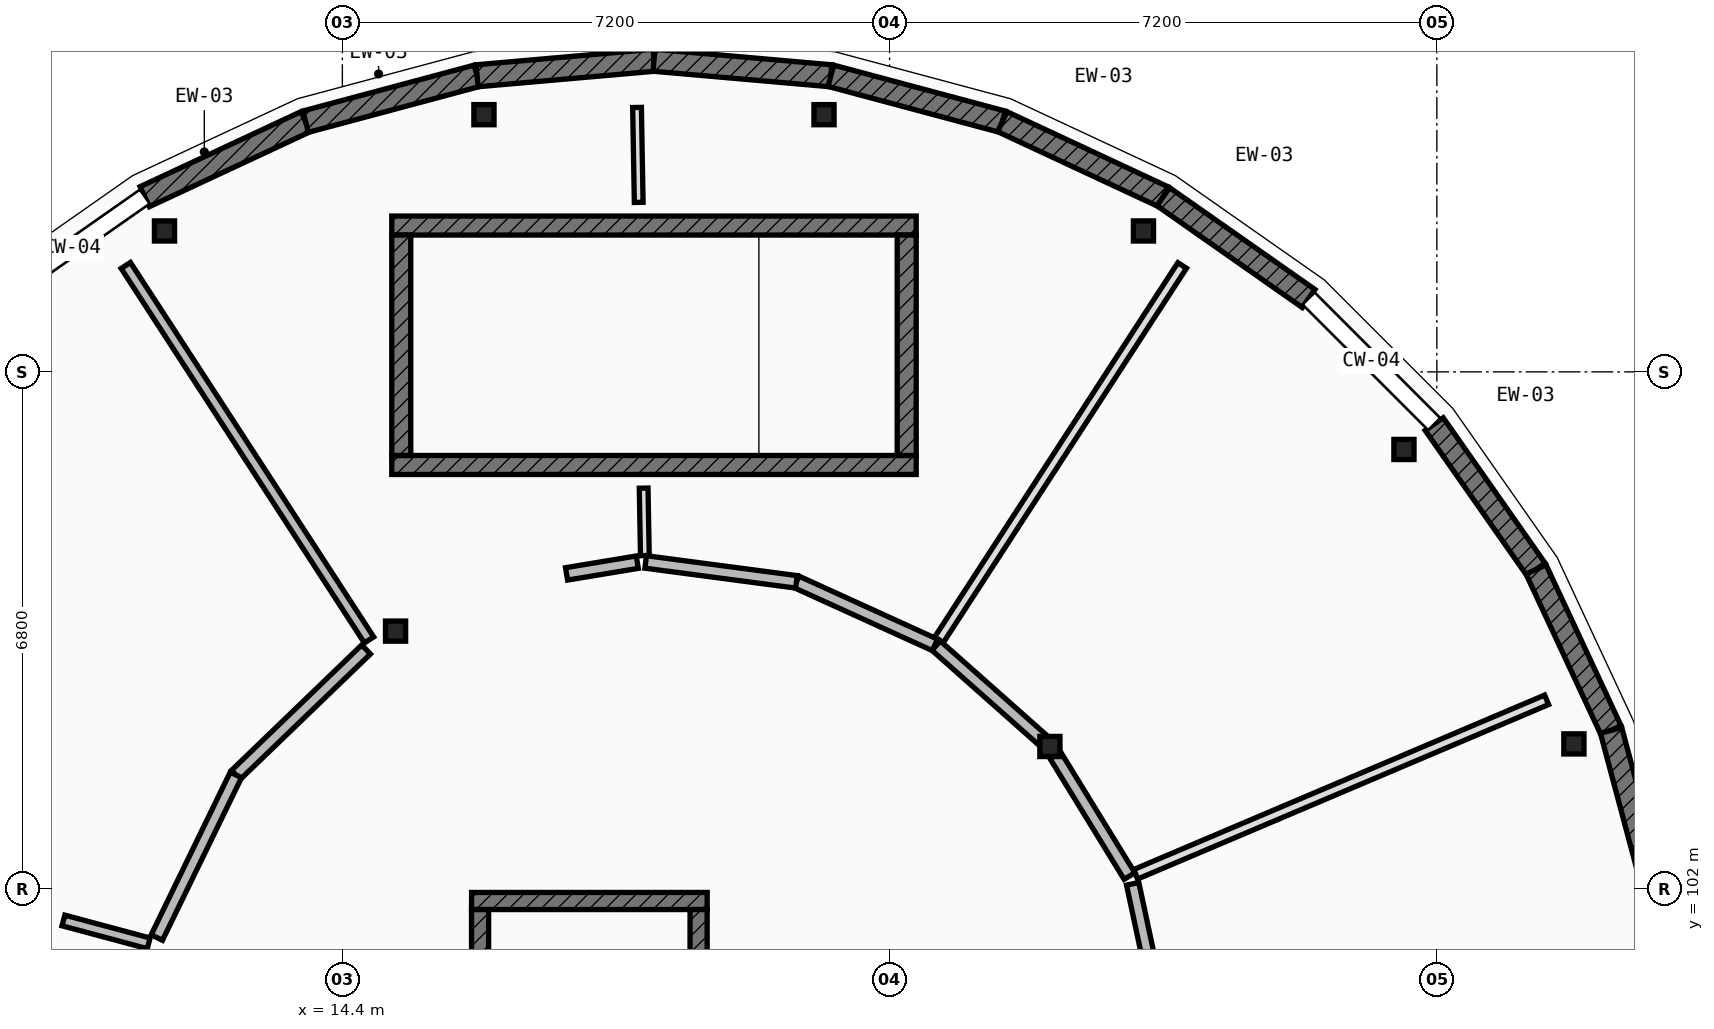
"""IFC4 building model, lengths in metres.
Left out: names, types, materials, properties, quantities, classifications, styles, units other than length and angle.
Written with IfcOpenShell. Run it as: python <this file> out.ifc"""

import sys

from ifc_helpers import new_model, si_unit, direction, frame, frame_2d, origin, origin_2d, place, context, subcontext, project, spatial, rectangle, extrude, element, fill, save


model = new_model("IFC4")
c1 = context("Model", 3, precision=1e-05, world=origin(), true_north=direction((0.0, 1.0)))
c2 = subcontext(c1, "Body", "Model", "MODEL_VIEW")
j1 = project(units=[si_unit("LENGTHUNIT", "METRE"), si_unit("PLANEANGLEUNIT", "RADIAN")], contexts=[c1])
p1 = place(None, origin())
s1 = spatial("IfcSite", under=j1, at=p1, CompositionType="ELEMENT")
p2 = place(p1, origin())
s2 = spatial("IfcBuilding", under=s1, at=p2, CompositionType="ELEMENT")
p3 = place(p2, frame((0.0, 0.0, 17.15)))
s3 = spatial("IfcBuildingStorey", under=s2, at=p3, CompositionType="ELEMENT", Elevation=17.15)
for number, where, z_axis, x_axis in (
    (1, (30.603, 103.905, 0.0), (0.0, 0.0, 1.0), (1.0, 0.0, 0.0)),
    (2, (28.367, 107.779, 0.0), (0.0, 0.0, 1.0), (1.0, 0.0, 0.0)),
    (3, (24.94, 110.654, 0.0), (0.0, 0.0, 1.0), (1.0, 0.0, 0.0)),
    (4, (20.737, 112.184, 0.0), (0.0, 0.0, 1.0), (1.0, 0.0, 0.0)),
    (5, (16.263, 112.184, 0.0), (0.0, 0.0, 1.0), (1.0, 0.0, 0.0)),
    (6, (12.06, 110.654, 0.0), (0.0, 0.0, 1.0), (1.0, 0.0, 0.0)),
    (7, (23.709, 103.871, 0.0), (0.0, 0.0, 1.0), (1.0, 0.0, 0.0)),
    (8, (15.1, 105.389, 0.0), (0.0, 0.0, 1.0), (1.0, 0.0, 0.0)),
):
    element("IfcColumn", number, at=place(p3, frame(where, z_axis=z_axis, x_axis=x_axis)), inside=s3, PredefinedType="COLUMN", context=c2, shape_type="SweptSolid", body=[
        extrude(rectangle(XDim=0.265, YDim=0.265, at=origin_2d()), origin(), (0.0, 0.0, 1.0), 4.2),
    ])
p4 = place(p3, frame((11.8, 111.105, 0.0), z_axis=(0.0, 0.0, 1.0), x_axis=(0.906321946979, 0.422587894318, 0.0)))
e9 = element("IfcWall", 9, at=p4, inside=s3, PredefinedType="ELEMENTEDWALL", context=c2, shape_type="SweptSolid", body=[
    extrude(rectangle(XDim=2.336, YDim=0.29, at=frame_2d((1.168, 0.0))), origin(), (0.0, 0.0, 1.0), 3.369),
])
p5 = place(p4, frame((0.468, 0.0, 0.85)))
e10 = element("IfcOpeningElement", 10, at=p5, cuts=e9, PredefinedType="OPENING", context=c2, shape_type="SweptSolid", body=[
    extrude(rectangle(XDim=1.4, YDim=1.25, at=frame_2d((0.7, 0.625))), frame((0.0, 0.155, 0.0), z_axis=(0.0, -1.0, 0.0), x_axis=(1.0, 0.0, 0.0)), (0.0, 0.0, 1.0), 0.31),
])
p6 = place(p3, frame((13.917, 112.092, 0.0), z_axis=(0.0, 0.0, 1.0), x_axis=(0.965981166673, 0.258612423585, 0.0)))
e11 = element("IfcWall", 11, at=p6, inside=s3, PredefinedType="ELEMENTEDWALL", context=c2, shape_type="SweptSolid", body=[
    extrude(rectangle(XDim=2.335, YDim=0.29, at=frame_2d((1.168, 0.0))), origin(), (0.0, 0.0, 1.0), 3.369),
])
p7 = place(p6, frame((0.468, 0.0, 0.85)))
e12 = element("IfcOpeningElement", 12, at=p7, cuts=e11, PredefinedType="OPENING", context=c2, shape_type="SweptSolid", body=[
    extrude(rectangle(XDim=1.4, YDim=1.6, at=frame_2d((0.7, 0.8))), frame((0.0, 0.155, 0.0), z_axis=(0.0, -1.0, 0.0), x_axis=(1.0, 0.0, 0.0)), (0.0, 0.0, 1.0), 0.31),
])
for number, where, z_axis, x_axis in (
    (13, (16.173, 112.696, 0.0), (0.0, 0.0, 1.0), (0.996, 0.087, 0.0)),
    (14, (18.5, 112.9, 0.0), (0.0, 0.0, 1.0), (0.996, -0.087, 0.0)),
):
    element("IfcWall", number, at=place(p3, frame(where, z_axis=z_axis, x_axis=x_axis)), inside=s3, PredefinedType="ELEMENTEDWALL", context=c2, shape_type="SweptSolid", body=[
        extrude(rectangle(XDim=2.336, YDim=0.29, at=frame_2d((1.168, 0.0))), origin(), (0.0, 0.0, 1.0), 3.369),
    ])
p8 = place(p3, frame((20.827, 112.696, 0.0), z_axis=(0.0, 0.0, 1.0), x_axis=(0.965981166673, -0.258612423585, 0.0)))
e15 = element("IfcWall", 15, at=p8, inside=s3, PredefinedType="ELEMENTEDWALL", context=c2, shape_type="SweptSolid", body=[
    extrude(rectangle(XDim=2.335, YDim=0.29, at=frame_2d((1.168, 0.0))), origin(), (0.0, 0.0, 1.0), 3.369),
])
p9 = place(p8, frame((0.468, 0.0, 0.85)))
e16 = element("IfcOpeningElement", 16, at=p9, cuts=e15, PredefinedType="OPENING", context=c2, shape_type="SweptSolid", body=[
    extrude(rectangle(XDim=1.4, YDim=1.9, at=frame_2d((0.7, 0.95))), frame((0.0, 0.155, 0.0), z_axis=(0.0, -1.0, 0.0), x_axis=(1.0, 0.0, 0.0)), (0.0, 0.0, 1.0), 0.31),
])
p10 = place(p3, frame((23.083, 112.092, 0.0), z_axis=(0.0, 0.0, 1.0), x_axis=(0.906321946979, -0.422587894318, 0.0)))
e17 = element("IfcWall", 17, at=p10, inside=s3, PredefinedType="ELEMENTEDWALL", context=c2, shape_type="SweptSolid", body=[
    extrude(rectangle(XDim=2.336, YDim=0.29, at=frame_2d((1.168, 0.0))), origin(), (0.0, 0.0, 1.0), 3.369),
])
p11 = place(p10, frame((0.468, 0.0, 0.85)))
e18 = element("IfcOpeningElement", 18, at=p11, cuts=e17, PredefinedType="OPENING", context=c2, shape_type="SweptSolid", body=[
    extrude(rectangle(XDim=1.4, YDim=2.2, at=frame_2d((0.7, 1.1))), frame((0.0, 0.155, 0.0), z_axis=(0.0, -1.0, 0.0), x_axis=(1.0, 0.0, 0.0)), (0.0, 0.0, 1.0), 0.31),
])
p12 = place(p3, frame((25.2, 111.105, 0.0), z_axis=(0.0, 0.0, 1.0), x_axis=(0.819045278347, -0.573728883722, 0.0)))
e19 = element("IfcWall", 19, at=p12, inside=s3, PredefinedType="ELEMENTEDWALL", context=c2, shape_type="SweptSolid", body=[
    extrude(rectangle(XDim=2.336, YDim=0.29, at=frame_2d((1.168, 0.0))), origin(), (0.0, 0.0, 1.0), 3.369),
])
p13 = place(p12, frame((0.443, 0.0, 0.85)))
e20 = element("IfcOpeningElement", 20, at=p13, cuts=e19, PredefinedType="OPENING", context=c2, shape_type="SweptSolid", body=[
    extrude(rectangle(XDim=1.45, YDim=1.45, at=frame_2d((0.725, 0.725))), frame((0.0, 0.155, 0.0), z_axis=(0.0, -1.0, 0.0), x_axis=(1.0, 0.0, 0.0)), (0.0, 0.0, 1.0), 0.31),
])
p14 = place(p3, frame((28.765, 108.113, 0.0), z_axis=(0.0, 0.0, 1.0), x_axis=(0.573728883722, -0.819045278347, 0.0)))
e21 = element("IfcWall", 21, at=p14, inside=s3, PredefinedType="ELEMENTEDWALL", context=c2, shape_type="SweptSolid", body=[
    extrude(rectangle(XDim=2.336, YDim=0.29, at=frame_2d((1.168, 0.0))), origin(), (0.0, 0.0, 1.0), 3.369),
])
p15 = place(p14, frame((0.443, 0.0, 0.85)))
e22 = element("IfcOpeningElement", 22, at=p15, cuts=e21, PredefinedType="OPENING", context=c2, shape_type="SweptSolid", body=[
    extrude(rectangle(XDim=1.45, YDim=1.75, at=frame_2d((0.725, 0.875))), frame((0.0, 0.155, 0.0), z_axis=(0.0, -1.0, 0.0), x_axis=(1.0, 0.0, 0.0)), (0.0, 0.0, 1.0), 0.31),
])
p16 = place(p3, frame((30.105, 106.2, 0.0), z_axis=(0.0, 0.0, 1.0), x_axis=(0.422587894318, -0.906321946979, 0.0)))
e23 = element("IfcWall", 23, at=p16, inside=s3, PredefinedType="ELEMENTEDWALL", context=c2, shape_type="SweptSolid", body=[
    extrude(rectangle(XDim=2.336, YDim=0.29, at=frame_2d((1.168, 0.0))), origin(), (0.0, 0.0, 1.0), 3.369),
])
p17 = place(p16, frame((0.443, 0.0, 0.85)))
e24 = element("IfcOpeningElement", 24, at=p17, cuts=e23, PredefinedType="OPENING", context=c2, shape_type="SweptSolid", body=[
    extrude(rectangle(XDim=1.45, YDim=2.05, at=frame_2d((0.725, 1.025))), frame((0.0, 0.155, 0.0), z_axis=(0.0, -1.0, 0.0), x_axis=(1.0, 0.0, 0.0)), (0.0, 0.0, 1.0), 0.31),
])
p18 = place(p3, frame((31.092, 104.083, 0.0), z_axis=(0.0, 0.0, 1.0), x_axis=(0.258612423585, -0.965981166673, 0.0)))
e25 = element("IfcWall", 25, at=p18, inside=s3, PredefinedType="ELEMENTEDWALL", context=c2, shape_type="SweptSolid", body=[
    extrude(rectangle(XDim=2.335, YDim=0.29, at=frame_2d((1.168, 0.0))), origin(), (0.0, 0.0, 1.0), 3.369),
])
p19 = place(p18, frame((0.418, 0.0, 0.85)))
e26 = element("IfcOpeningElement", 26, at=p19, cuts=e25, PredefinedType="OPENING", context=c2, shape_type="SweptSolid", body=[
    extrude(rectangle(XDim=1.5, YDim=1.3, at=frame_2d((0.75, 0.65))), frame((0.0, 0.155, 0.0), z_axis=(0.0, -1.0, 0.0), x_axis=(1.0, 0.0, 0.0)), (0.0, 0.0, 1.0), 0.31),
])
p20 = place(p3, frame((15.05, 107.575, 0.0), z_axis=(0.0, 0.0, 1.0), x_axis=(1.0, 0.0, 0.0)))
e27 = element("IfcWall", 27, at=p20, inside=s3, PredefinedType="SHEAR", context=c2, shape_type="SweptSolid", body=[
    extrude(rectangle(XDim=6.9, YDim=0.25, at=frame_2d((3.45, 0.0))), origin(), (0.0, 0.0, 1.0), 4.015),
])
p21 = place(p20, frame((0.43, 0.0, 0.0)))
e28 = element("IfcOpeningElement", 28, at=p21, cuts=e27, PredefinedType="OPENING", context=c2, shape_type="SweptSolid", body=[
    extrude(rectangle(XDim=1.1, YDim=2.15, at=frame_2d((0.55, 1.075))), frame((0.0, 0.135, 0.0), z_axis=(0.0, -1.0, 0.0), x_axis=(1.0, 0.0, 0.0)), (0.0, 0.0, 1.0), 0.27),
])
p22 = place(p3, frame((15.05, 110.725, 0.0), z_axis=(0.0, 0.0, 1.0), x_axis=(1.0, 0.0, 0.0)))
e29 = element("IfcWall", 29, at=p22, inside=s3, PredefinedType="SHEAR", context=c2, shape_type="SweptSolid", body=[
    extrude(rectangle(XDim=6.9, YDim=0.25, at=frame_2d((3.45, 0.0))), origin(), (0.0, 0.0, 1.0), 4.015),
])
for number, where, z_axis, x_axis in (
    (30, (15.175, 107.7, 0.0), (0.0, 0.0, 1.0), (0.0, 1.0, 0.0)),
    (31, (21.825, 107.7, 0.0), (0.0, 0.0, 1.0), (0.0, 1.0, 0.0)),
):
    element("IfcWall", number, at=place(p3, frame(where, z_axis=z_axis, x_axis=x_axis)), inside=s3, PredefinedType="SHEAR", context=c2, shape_type="SweptSolid", body=[
        extrude(rectangle(XDim=2.9, YDim=0.25, at=frame_2d((1.45, 0.0))), origin(), (0.0, 0.0, 1.0), 4.015),
    ])
p23 = place(p3, frame((16.1, 101.838, 0.0), z_axis=(0.0, 0.0, 1.0), x_axis=(1.0, 0.0, 0.0)))
e32 = element("IfcWall", 32, at=p23, inside=s3, PredefinedType="SHEAR", context=c2, shape_type="SweptSolid", body=[
    extrude(rectangle(XDim=3.1, YDim=0.225, at=frame_2d((1.55, 0.0))), origin(), (0.0, 0.0, 1.0), 4.015),
])
for number, where, z_axis, x_axis in (
    (33, (16.212, 99.575, 0.0), (0.0, 0.0, 1.0), (0.0, 1.0, 0.0)),
    (34, (19.087, 99.575, 0.0), (0.0, 0.0, 1.0), (0.0, 1.0, 0.0)),
):
    element("IfcWall", number, at=place(p3, frame(where, z_axis=z_axis, x_axis=x_axis)), inside=s3, PredefinedType="SHEAR", context=c2, shape_type="SweptSolid", body=[
        extrude(rectangle(XDim=2.15, YDim=0.225, at=frame_2d((1.075, 0.0))), origin(), (0.0, 0.0, 1.0), 4.015),
    ])
p24 = place(p3, frame((14.751, 105.273, 0.0), z_axis=(0.0, 0.0, 1.0), x_axis=(-0.544677189284, 0.838645789039, 0.0)))
e35 = element("IfcWall", 35, at=p24, inside=s3, PredefinedType="PARTITIONING", context=c2, shape_type="SweptSolid", body=[
    extrude(rectangle(XDim=5.875, YDim=0.145, at=frame_2d((2.938, 0.0))), origin(), (0.0, 0.0, 1.0), 3.344),
])
p25 = place(p3, frame((11.852, 101.281, 0.0), z_axis=(0.0, 0.0, 1.0), x_axis=(-0.965846685591, 0.259114221787, 0.0)))
e36 = element("IfcWall", 36, at=p25, inside=s3, PredefinedType="PARTITIONING", context=c2, shape_type="SweptSolid", body=[
    extrude(rectangle(XDim=1.162, YDim=0.145, at=frame_2d((0.581, 0.0))), origin(), (0.0, 0.0, 1.0), 3.344),
])
p26 = place(p3, frame((24.836, 102.189, 0.0), z_axis=(0.0, 0.0, 1.0), x_axis=(0.920468107404, 0.390817685438, 0.0)))
e37 = element("IfcWall", 37, at=p26, inside=s3, PredefinedType="PLUMBINGWALL", context=c2, shape_type="SweptSolid", body=[
    extrude(rectangle(XDim=5.875, YDim=0.135, at=frame_2d((2.938, 0.0))), origin(), (0.0, 0.0, 1.0), 3.344),
])
p27 = place(p3, frame((22.249, 105.273, 0.0), z_axis=(0.0, 0.0, 1.0), x_axis=(0.544677189284, 0.838645789039, 0.0)))
e38 = element("IfcWall", 38, at=p27, inside=s3, PredefinedType="PLUMBINGWALL", context=c2, shape_type="SweptSolid", body=[
    extrude(rectangle(XDim=5.875, YDim=0.135, at=frame_2d((2.938, 0.0))), origin(), (0.0, 0.0, 1.0), 3.344),
])
p28 = place(p3, frame((18.38, 106.382, 0.0), z_axis=(0.0, 0.0, 1.0), x_axis=(-0.017869018934, 0.999840336335, 0.0)))
e39 = element("IfcWall", 39, at=p28, inside=s3, PredefinedType="PARTITIONING", context=c2, shape_type="SweptSolid", body=[
    extrude(rectangle(XDim=0.888, YDim=0.115, at=frame_2d((0.444, 0.0))), origin(), (0.0, 0.0, 1.0), 3.344),
])
p29 = place(p3, frame((18.299, 111.03, 0.0), z_axis=(0.0, 0.0, 1.0), x_axis=(-0.017589147167, 0.999845298985, 0.0)))
e40 = element("IfcWall", 40, at=p29, inside=s3, PredefinedType="PARTITIONING", context=c2, shape_type="SweptSolid", body=[
    extrude(rectangle(XDim=1.249, YDim=0.115, at=frame_2d((0.625, 0.0))), origin(), (0.0, 0.0, 1.0), 3.344),
])
p30 = place(p3, frame((14.712, 105.147, 0.0), z_axis=(0.0, 0.0, 1.0), x_axis=(-0.720225223762, -0.693740316731, 0.0)))
e41 = element("IfcWall", 41, at=p30, inside=s3, PredefinedType="PARTITIONING", context=c2, shape_type="SweptSolid", body=[
    extrude(rectangle(XDim=2.378, YDim=0.165, at=frame_2d((1.189, 0.0))), origin(), (0.0, 0.0, 1.0), 3.344),
])
p31 = place(p30, frame((0.69, 0.0, 0.0)))
e42 = element("IfcOpeningElement", 42, at=p31, cuts=e41, PredefinedType="OPENING", context=c2, shape_type="SweptSolid", body=[
    extrude(rectangle(XDim=1.0, YDim=2.14, at=frame_2d((0.5, 1.07))), frame((0.0, 0.093, 0.0), z_axis=(0.0, -1.0, 0.0), x_axis=(1.0, 0.0, 0.0)), (0.0, 0.0, 1.0), 0.185),
])
p32 = place(p3, frame((12.999, 103.497, 0.0), z_axis=(0.0, 0.0, 1.0), x_axis=(-0.437088964267, -0.899418277175, 0.0)))
e43 = element("IfcWall", 43, at=p32, inside=s3, PredefinedType="PARTITIONING", context=c2, shape_type="SweptSolid", body=[
    extrude(rectangle(XDim=2.379, YDim=0.165, at=frame_2d((1.19, 0.0))), origin(), (0.0, 0.0, 1.0), 3.344),
])
p33 = place(p3, frame((25.296, 99.737, 0.0), z_axis=(0.0, 0.0, 1.0), x_axis=(-0.209199758456, 0.977872926848, 0.0)))
e44 = element("IfcWall", 44, at=p33, inside=s3, PredefinedType="PARTITIONING", context=c2, shape_type="SweptSolid", body=[
    extrude(rectangle(XDim=2.38, YDim=0.165, at=frame_2d((1.19, 0.0))), origin(), (0.0, 0.0, 1.0), 3.344),
])
p34 = place(p3, frame((24.756, 102.166, 0.0), z_axis=(0.0, 0.0, 1.0), x_axis=(-0.523293079125, 0.852152775821, 0.0)))
e45 = element("IfcWall", 45, at=p34, inside=s3, PredefinedType="PARTITIONING", context=c2, shape_type="SweptSolid", body=[
    extrude(rectangle(XDim=1.863, YDim=0.165, at=frame_2d((0.932, 0.0))), origin(), (0.0, 0.0, 1.0), 3.344),
])
p35 = place(p34, frame((0.482, 0.0, 0.0)))
e46 = element("IfcOpeningElement", 46, at=p35, cuts=e45, PredefinedType="OPENING", context=c2, shape_type="SweptSolid", body=[
    extrude(rectangle(XDim=0.9, YDim=2.1, at=frame_2d((0.45, 1.05))), frame((0.0, 0.093, 0.0), z_axis=(0.0, -1.0, 0.0), x_axis=(1.0, 0.0, 0.0)), (0.0, 0.0, 1.0), 0.185),
])
p36 = place(p3, frame((23.606, 103.962, 0.0), z_axis=(0.0, 0.0, 1.0), x_axis=(-0.748225706364, 0.66344426468, 0.0)))
e47 = element("IfcWall", 47, at=p36, inside=s3, PredefinedType="PARTITIONING", context=c2, shape_type="SweptSolid", body=[
    extrude(rectangle(XDim=1.863, YDim=0.165, at=frame_2d((0.932, 0.0))), origin(), (0.0, 0.0, 1.0), 3.344),
])
p37 = place(p3, frame((22.196, 105.208, 0.0), z_axis=(0.0, 0.0, 1.0), x_axis=(-0.910195152859, 0.414179651495, 0.0)))
e48 = element("IfcWall", 48, at=p37, inside=s3, PredefinedType="PARTITIONING", context=c2, shape_type="SweptSolid", body=[
    extrude(rectangle(XDim=2.002, YDim=0.165, at=frame_2d((1.001, 0.0))), origin(), (0.0, 0.0, 1.0), 3.344),
])
p38 = place(p37, frame((0.53, 0.0, 0.0)))
e49 = element("IfcOpeningElement", 49, at=p38, cuts=e48, PredefinedType="OPENING", context=c2, shape_type="SweptSolid", body=[
    extrude(rectangle(XDim=0.94, YDim=2.1, at=frame_2d((0.47, 1.05))), frame((0.0, 0.093, 0.0), z_axis=(0.0, -1.0, 0.0), x_axis=(1.0, 0.0, 0.0)), (0.0, 0.0, 1.0), 0.185),
])
p39 = place(p3, frame((20.374, 106.037, 0.0), z_axis=(0.0, 0.0, 1.0), x_axis=(-0.991386025062, 0.13097232269, 0.0)))
e50 = element("IfcWall", 50, at=p39, inside=s3, PredefinedType="PARTITIONING", context=c2, shape_type="SweptSolid", body=[
    extrude(rectangle(XDim=2.0, YDim=0.165, at=frame_2d((1.0, 0.0))), origin(), (0.0, 0.0, 1.0), 3.344),
])
p40 = place(p3, frame((18.28, 106.296, 0.0), z_axis=(0.0, 0.0, 1.0), x_axis=(-0.986596185152, -0.163180781477, 0.0)))
e51 = element("IfcWall", 51, at=p40, inside=s3, PredefinedType="PARTITIONING", context=c2, shape_type="SweptSolid", body=[
    extrude(rectangle(XDim=0.943, YDim=0.165, at=frame_2d((0.471, 0.0))), origin(), (0.0, 0.0, 1.0), 3.344),
])
p41 = place(p5, origin())
e52 = element("IfcWindow", 52, at=p41, inside=s3, PartitioningType="SINGLE_PANEL", PredefinedType="WINDOW", context=c2, shape_type="SweptSolid", body=[
    extrude(rectangle(XDim=1.4, YDim=1.25, at=frame_2d((0.7, 0.625))), frame((0.0, 0.03, 0.0), z_axis=(0.0, -1.0, 0.0), x_axis=(1.0, 0.0, 0.0)), (0.0, 0.0, 1.0), 0.06),
])
fill(e10, e52)
p42 = place(p7, origin())
e53 = element("IfcWindow", 53, at=p42, inside=s3, PartitioningType="SINGLE_PANEL", PredefinedType="WINDOW", context=c2, shape_type="SweptSolid", body=[
    extrude(rectangle(XDim=1.4, YDim=1.6, at=frame_2d((0.7, 0.8))), frame((0.0, 0.03, 0.0), z_axis=(0.0, -1.0, 0.0), x_axis=(1.0, 0.0, 0.0)), (0.0, 0.0, 1.0), 0.06),
])
fill(e12, e53)
p43 = place(p9, origin())
e54 = element("IfcWindow", 54, at=p43, inside=s3, PartitioningType="SINGLE_PANEL", PredefinedType="WINDOW", context=c2, shape_type="SweptSolid", body=[
    extrude(rectangle(XDim=1.4, YDim=1.9, at=frame_2d((0.7, 0.95))), frame((0.0, 0.03, 0.0), z_axis=(0.0, -1.0, 0.0), x_axis=(1.0, 0.0, 0.0)), (0.0, 0.0, 1.0), 0.06),
])
fill(e16, e54)
p44 = place(p11, origin())
e55 = element("IfcWindow", 55, at=p44, inside=s3, PartitioningType="SINGLE_PANEL", PredefinedType="WINDOW", context=c2, shape_type="SweptSolid", body=[
    extrude(rectangle(XDim=1.4, YDim=2.2, at=frame_2d((0.7, 1.1))), frame((0.0, 0.03, 0.0), z_axis=(0.0, -1.0, 0.0), x_axis=(1.0, 0.0, 0.0)), (0.0, 0.0, 1.0), 0.06),
])
fill(e18, e55)
p45 = place(p13, origin())
e56 = element("IfcWindow", 56, at=p45, inside=s3, PartitioningType="SINGLE_PANEL", PredefinedType="WINDOW", context=c2, shape_type="SweptSolid", body=[
    extrude(rectangle(XDim=1.45, YDim=1.45, at=frame_2d((0.725, 0.725))), frame((0.0, 0.03, 0.0), z_axis=(0.0, -1.0, 0.0), x_axis=(1.0, 0.0, 0.0)), (0.0, 0.0, 1.0), 0.06),
])
fill(e20, e56)
p46 = place(p15, origin())
e57 = element("IfcWindow", 57, at=p46, inside=s3, PartitioningType="SINGLE_PANEL", PredefinedType="WINDOW", context=c2, shape_type="SweptSolid", body=[
    extrude(rectangle(XDim=1.45, YDim=1.75, at=frame_2d((0.725, 0.875))), frame((0.0, 0.03, 0.0), z_axis=(0.0, -1.0, 0.0), x_axis=(1.0, 0.0, 0.0)), (0.0, 0.0, 1.0), 0.06),
])
fill(e22, e57)
p47 = place(p17, origin())
e58 = element("IfcWindow", 58, at=p47, inside=s3, PartitioningType="SINGLE_PANEL", PredefinedType="WINDOW", context=c2, shape_type="SweptSolid", body=[
    extrude(rectangle(XDim=1.45, YDim=2.05, at=frame_2d((0.725, 1.025))), frame((0.0, 0.03, 0.0), z_axis=(0.0, -1.0, 0.0), x_axis=(1.0, 0.0, 0.0)), (0.0, 0.0, 1.0), 0.06),
])
fill(e24, e58)
p48 = place(p19, origin())
e59 = element("IfcWindow", 59, at=p48, inside=s3, PartitioningType="SINGLE_PANEL", PredefinedType="WINDOW", context=c2, shape_type="SweptSolid", body=[
    extrude(rectangle(XDim=1.5, YDim=1.3, at=frame_2d((0.75, 0.65))), frame((0.0, 0.03, 0.0), z_axis=(0.0, -1.0, 0.0), x_axis=(1.0, 0.0, 0.0)), (0.0, 0.0, 1.0), 0.06),
])
fill(e26, e59)
p49 = place(p21, origin())
e60 = element("IfcDoor", 60, at=p49, inside=s3, OperationType="SINGLE_SWING_RIGHT", PredefinedType="DOOR", context=c2, shape_type="SweptSolid", body=[
    extrude(rectangle(XDim=1.1, YDim=2.15, at=frame_2d((0.55, 1.075))), frame((0.0, 0.025, 0.0), z_axis=(0.0, -1.0, 0.0), x_axis=(1.0, 0.0, 0.0)), (0.0, 0.0, 1.0), 0.05),
])
fill(e28, e60)
p50 = place(p31, origin())
e61 = element("IfcDoor", 61, at=p50, inside=s3, OperationType="SINGLE_SWING_LEFT", PredefinedType="DOOR", context=c2, shape_type="SweptSolid", body=[
    extrude(rectangle(XDim=1.0, YDim=2.14, at=frame_2d((0.5, 1.07))), frame((0.0, 0.025, 0.0), z_axis=(0.0, -1.0, 0.0), x_axis=(1.0, 0.0, 0.0)), (0.0, 0.0, 1.0), 0.05),
])
fill(e42, e61)
p51 = place(p35, origin())
e62 = element("IfcDoor", 62, at=p51, inside=s3, OperationType="SINGLE_SWING_LEFT", PredefinedType="DOOR", context=c2, shape_type="SweptSolid", body=[
    extrude(rectangle(XDim=0.9, YDim=2.1, at=frame_2d((0.45, 1.05))), frame((0.0, 0.025, 0.0), z_axis=(0.0, -1.0, 0.0), x_axis=(1.0, 0.0, 0.0)), (0.0, 0.0, 1.0), 0.05),
])
fill(e46, e62)
p52 = place(p38, origin())
e63 = element("IfcDoor", 63, at=p52, inside=s3, OperationType="SINGLE_SWING_RIGHT", PredefinedType="DOOR", context=c2, shape_type="SweptSolid", body=[
    extrude(rectangle(XDim=0.94, YDim=2.1, at=frame_2d((0.47, 1.05))), frame((0.0, 0.025, 0.0), z_axis=(0.0, -1.0, 0.0), x_axis=(1.0, 0.0, 0.0)), (0.0, 0.0, 1.0), 0.05),
])
fill(e49, e63)
save(model, sys.argv[1])
